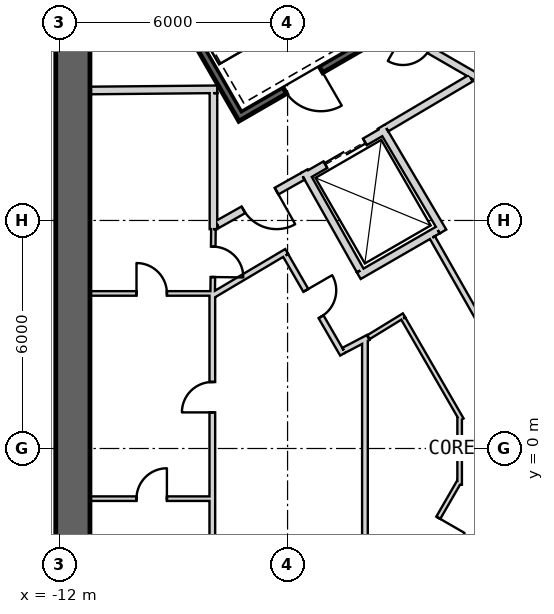
"""IFC4 building model, lengths in metres.
Left out: names, types, materials, properties, quantities, classifications, styles, units other than length and angle.
Written with IfcOpenShell. Run it as: python <this file> out.ifc"""

import sys

from ifc_helpers import new_model, si_unit, direction, frame, frame_2d, origin, place, context, subcontext, project, spatial, rectangle, extrude, element, fill, save


model = new_model("IFC4")
c1 = context("Model", 3, precision=1e-05, world=origin(), true_north=direction((0.0, 1.0)))
c2 = subcontext(c1, "Body", "Model", "MODEL_VIEW")
j1 = project(units=[si_unit("LENGTHUNIT", "METRE"), si_unit("PLANEANGLEUNIT", "RADIAN")], contexts=[c1])
p1 = place(None, origin())
s1 = spatial("IfcSite", under=j1, at=p1, CompositionType="ELEMENT")
p2 = place(p1, origin())
s2 = spatial("IfcBuilding", under=s1, at=p2, CompositionType="ELEMENT")
p3 = place(p2, frame((0.0, 0.0, -11.0)))
s3 = spatial("IfcBuildingStorey", under=s2, at=p3, CompositionType="ELEMENT", Elevation=-11.0)
p4 = place(p3, frame((19.475, 2.208, -0.4), z_axis=(0.0, 0.0, 1.0), x_axis=(-0.866028369851, 0.499994862586, 0.0)))
e1 = element("IfcWall", 1, at=p4, inside=s3, PredefinedType="SHEAR", context=c2, shape_type="SweptSolid", body=[
    extrude(rectangle(XDim=31.523, YDim=0.9, at=frame_2d((15.762, 0.0))), origin(), (0.0, 0.0, 1.0), 5.9),
])
p5 = place(p4, frame((3.612, 0.0, 0.4)))
e2 = element("IfcOpeningElement", 2, at=p5, cuts=e1, PredefinedType="OPENING", context=c2, shape_type="SweptSolid", body=[
    extrude(rectangle(XDim=1.2, YDim=2.4, at=frame_2d((0.6, 1.2))), frame((0.0, 0.46, 0.0), z_axis=(0.0, -1.0, 0.0), x_axis=(1.0, 0.0, 0.0)), (0.0, 0.0, 1.0), 0.92),
])
p6 = place(p4, frame((26.712, 0.0, 0.4)))
e3 = element("IfcOpeningElement", 3, at=p6, cuts=e1, PredefinedType="OPENING", context=c2, shape_type="SweptSolid", body=[
    extrude(rectangle(XDim=1.2, YDim=2.4, at=frame_2d((0.6, 1.2))), frame((0.0, 0.46, 0.0), z_axis=(0.0, -1.0, 0.0), x_axis=(1.0, 0.0, 0.0)), (0.0, 0.0, 1.0), 0.92),
])
p7 = place(p3, frame((-11.65, 15.762, -0.4), z_axis=(0.0, 0.0, 1.0), x_axis=(0.0, -1.0, 0.0)))
e4 = element("IfcWall", 4, at=p7, inside=s3, PredefinedType="SHEAR", context=c2, shape_type="SweptSolid", body=[
    extrude(rectangle(XDim=31.523, YDim=0.9, at=frame_2d((15.762, 0.0))), origin(), (0.0, 0.0, 1.0), 5.9),
])
p8 = place(p7, frame((3.612, 0.0, 0.4)))
e5 = element("IfcOpeningElement", 5, at=p8, cuts=e4, PredefinedType="OPENING", context=c2, shape_type="SweptSolid", body=[
    extrude(rectangle(XDim=1.2, YDim=2.4, at=frame_2d((0.6, 1.2))), frame((0.0, 0.46, 0.0), z_axis=(0.0, -1.0, 0.0), x_axis=(1.0, 0.0, 0.0)), (0.0, 0.0, 1.0), 0.92),
])
p9 = place(p7, frame((26.712, 0.0, 0.4)))
e6 = element("IfcOpeningElement", 6, at=p9, cuts=e4, PredefinedType="OPENING", context=c2, shape_type="SweptSolid", body=[
    extrude(rectangle(XDim=1.2, YDim=2.4, at=frame_2d((0.6, 1.2))), frame((0.0, 0.46, 0.0), z_axis=(0.0, -1.0, 0.0), x_axis=(1.0, 0.0, 0.0)), (0.0, 0.0, 1.0), 0.92),
])
p10 = place(p3, frame((-7.825, -17.97, -0.4), z_axis=(0.0, 0.0, 1.0), x_axis=(0.866028369851, 0.499994862586, 0.0)))
e7 = element("IfcWall", 7, at=p10, inside=s3, PredefinedType="SHEAR", context=c2, shape_type="SweptSolid", body=[
    extrude(rectangle(XDim=31.523, YDim=0.9, at=frame_2d((15.762, 0.0))), origin(), (0.0, 0.0, 1.0), 5.9),
])
p11 = place(p10, frame((17.862, 0.0, 0.4)))
e8 = element("IfcOpeningElement", 8, at=p11, cuts=e7, PredefinedType="OPENING", context=c2, shape_type="SweptSolid", body=[
    extrude(rectangle(XDim=1.2, YDim=2.4, at=frame_2d((0.6, 1.2))), frame((0.0, 0.46, 0.0), z_axis=(0.0, -1.0, 0.0), x_axis=(1.0, 0.0, 0.0)), (0.0, 0.0, 1.0), 0.92),
])
p12 = place(p10, frame((20.562, 0.0, 0.4)))
e9 = element("IfcOpeningElement", 9, at=p12, cuts=e7, PredefinedType="OPENING", context=c2, shape_type="SweptSolid", body=[
    extrude(rectangle(XDim=1.2, YDim=2.4, at=frame_2d((0.6, 1.2))), frame((0.0, 0.46, 0.0), z_axis=(0.0, -1.0, 0.0), x_axis=(1.0, 0.0, 0.0)), (0.0, 0.0, 1.0), 0.92),
])
p13 = place(p10, frame((26.712, 0.0, 0.4)))
e10 = element("IfcOpeningElement", 10, at=p13, cuts=e7, PredefinedType="OPENING", context=c2, shape_type="SweptSolid", body=[
    extrude(rectangle(XDim=1.2, YDim=2.4, at=frame_2d((0.6, 1.2))), frame((0.0, 0.46, 0.0), z_axis=(0.0, -1.0, 0.0), x_axis=(1.0, 0.0, 0.0)), (0.0, 0.0, 1.0), 0.92),
])
p14 = place(p10, frame((3.612, 0.0, 0.4)))
e11 = element("IfcOpeningElement", 11, at=p14, cuts=e7, PredefinedType="OPENING", context=c2, shape_type="SweptSolid", body=[
    extrude(rectangle(XDim=1.2, YDim=2.4, at=frame_2d((0.6, 1.2))), frame((0.0, 0.46, 0.0), z_axis=(0.0, -1.0, 0.0), x_axis=(1.0, 0.0, 0.0)), (0.0, 0.0, 1.0), 0.92),
])
p15 = place(p3, frame((-11.245, 15.678, -0.4), z_axis=(0.0, 0.0, 1.0), x_axis=(0.499977274689, -0.866038523851, 0.0)))
e12 = element("IfcWall", 12, at=p15, inside=s3, PredefinedType="SHEAR", context=c2, shape_type="SweptSolid", body=[
    extrude(rectangle(XDim=8.1, YDim=0.2, at=frame_2d((4.05, 0.0))), origin(), (0.0, 0.0, 1.0), 5.5),
])
p16 = place(p3, frame((-7.159, 8.8, -0.4), z_axis=(0.0, 0.0, 1.0), x_axis=(0.866047807691, 0.499961193289, 0.0)))
e13 = element("IfcWall", 13, at=p16, inside=s3, PredefinedType="SHEAR", context=c2, shape_type="SweptSolid", body=[
    extrude(rectangle(XDim=3.6, YDim=0.2, at=frame_2d((1.8, 0.0))), origin(), (0.0, 0.0, 1.0), 5.5),
])
p17 = place(p16, frame((1.25, 0.0, 0.4)))
e14 = element("IfcOpeningElement", 14, at=p17, cuts=e13, PredefinedType="OPENING", context=c2, shape_type="SweptSolid", body=[
    extrude(rectangle(XDim=1.1, YDim=2.1, at=frame_2d((0.55, 1.05))), frame((0.0, 0.11, 0.0), z_axis=(0.0, -1.0, 0.0), x_axis=(1.0, 0.0, 0.0)), (0.0, 0.0, 1.0), 0.22),
])
p18 = place(p3, frame((-5.524, 7.168, 0.0), z_axis=(0.0, 0.0, 1.0), x_axis=(0.866024647952, 0.500001309137, 0.0)))
e15 = element("IfcWall", 15, at=p18, inside=s3, PredefinedType="PLUMBINGWALL", context=c2, shape_type="SweptSolid", body=[
    extrude(rectangle(XDim=2.4, YDim=0.2, at=frame_2d((1.2, 0.0))), origin(), (0.0, 0.0, 1.0), 5.1),
])
p19 = place(p18, frame((0.6, 0.0, 0.0)))
e16 = element("IfcOpeningElement", 16, at=p19, cuts=e15, PredefinedType="OPENING", context=c2, shape_type="SweptSolid", body=[
    extrude(rectangle(XDim=1.2, YDim=2.4, at=frame_2d((0.6, 1.2))), frame((0.0, 0.11, 0.0), z_axis=(0.0, -1.0, 0.0), x_axis=(1.0, 0.0, 0.0)), (0.0, 0.0, 1.0), 0.22),
])
p20 = place(p3, frame((-3.538, 8.465, 0.0), z_axis=(0.0, 0.0, 1.0), x_axis=(0.508616218331, -0.860993346345, 0.0)))
e17 = element("IfcWall", 17, at=p20, inside=s3, PredefinedType="PLUMBINGWALL", context=c2, shape_type="SweptSolid", body=[
    extrude(rectangle(XDim=3.2, YDim=0.2, at=frame_2d((1.6, 0.0))), origin(), (0.0, 0.0, 1.0), 5.1),
])
p21 = place(p3, frame((-2.047, 5.746, 0.0), z_axis=(0.0, 0.0, 1.0), x_axis=(-0.866024647952, -0.500001309137, 0.0)))
e18 = element("IfcWall", 18, at=p21, inside=s3, PredefinedType="PLUMBINGWALL", context=c2, shape_type="SweptSolid", body=[
    extrude(rectangle(XDim=2.4, YDim=0.2, at=frame_2d((1.2, 0.0))), origin(), (0.0, 0.0, 1.0), 5.1),
])
p22 = place(p3, frame((-5.562, 7.296, 0.0), z_axis=(0.0, 0.0, 1.0), x_axis=(0.49134651263, -0.870964180966, 0.0)))
e19 = element("IfcWall", 19, at=p22, inside=s3, PredefinedType="PLUMBINGWALL", context=c2, shape_type="SweptSolid", body=[
    extrude(rectangle(XDim=3.0, YDim=0.2, at=frame_2d((1.5, 0.0))), origin(), (0.0, 0.0, 1.0), 5.1),
])
p23 = place(p3, frame((-11.2, 4.08, 0.0), z_axis=(0.0, 0.0, 1.0), x_axis=(1.0, 0.0, 0.0)))
e20 = element("IfcWall", 20, at=p23, inside=s3, PredefinedType="PARTITIONING", context=c2, shape_type="SweptSolid", body=[
    extrude(rectangle(XDim=3.25, YDim=0.12, at=frame_2d((1.625, 0.0))), origin(), (0.0, 0.0, 1.0), 5.1),
])
p24 = place(p23, frame((1.225, 0.0, 0.0)))
e21 = element("IfcOpeningElement", 21, at=p24, cuts=e20, PredefinedType="OPENING", context=c2, shape_type="SweptSolid", body=[
    extrude(rectangle(XDim=0.8, YDim=2.1, at=frame_2d((0.4, 1.05))), frame((0.0, 0.07, 0.0), z_axis=(0.0, -1.0, 0.0), x_axis=(1.0, 0.0, 0.0)), (0.0, 0.0, 1.0), 0.14),
])
p25 = place(p3, frame((-7.85, 9.451, 0.0), z_axis=(0.0, 0.0, 1.0), x_axis=(-0.999957167047, -0.009255488683, 0.0)))
e22 = element("IfcWall", 22, at=p25, inside=s3, PredefinedType="PARTITIONING", context=c2, shape_type="SweptSolid", body=[
    extrude(rectangle(XDim=3.35, YDim=0.2, at=frame_2d((1.675, 0.0))), origin(), (0.0, 0.0, 1.0), 5.1),
])
p26 = place(p3, frame((-7.95, 5.772, 0.0), z_axis=(0.0, 0.0, 1.0), x_axis=(0.0, 1.0, 0.0)))
e23 = element("IfcWall", 23, at=p26, inside=s3, PredefinedType="PARTITIONING", context=c2, shape_type="SweptSolid", body=[
    extrude(rectangle(XDim=3.578, YDim=0.2, at=frame_2d((1.789, 0.0))), origin(), (0.0, 0.0, 1.0), 5.1),
])
p27 = place(p3, frame((-7.971, 4.05, 0.0), z_axis=(0.0, 0.0, 1.0), x_axis=(0.012047318415, 0.999927428426, 0.0)))
e24 = element("IfcWall", 24, at=p27, inside=s3, PredefinedType="PARTITIONING", context=c2, shape_type="SweptSolid", body=[
    extrude(rectangle(XDim=1.723, YDim=0.12, at=frame_2d((0.861, 0.0))), origin(), (0.0, 0.0, 1.0), 5.1),
])
p28 = place(p27, frame((0.461, 0.0, 0.0)))
e25 = element("IfcOpeningElement", 25, at=p28, cuts=e24, PredefinedType="OPENING", context=c2, shape_type="SweptSolid", body=[
    extrude(rectangle(XDim=0.8, YDim=2.1, at=frame_2d((0.4, 1.05))), frame((0.0, 0.07, 0.0), z_axis=(0.0, -1.0, 0.0), x_axis=(1.0, 0.0, 0.0)), (0.0, 0.0, 1.0), 0.14),
])
p29 = place(p3, frame((-11.2, -1.32, 0.0), z_axis=(0.0, 0.0, 1.0), x_axis=(1.0, 0.0, 0.0)))
e26 = element("IfcWall", 26, at=p29, inside=s3, PredefinedType="PARTITIONING", context=c2, shape_type="SweptSolid", body=[
    extrude(rectangle(XDim=3.25, YDim=0.12, at=frame_2d((1.625, 0.0))), origin(), (0.0, 0.0, 1.0), 5.1),
])
p30 = place(p29, frame((1.225, 0.0, 0.0)))
e27 = element("IfcOpeningElement", 27, at=p30, cuts=e26, PredefinedType="OPENING", context=c2, shape_type="SweptSolid", body=[
    extrude(rectangle(XDim=0.8, YDim=2.1, at=frame_2d((0.4, 1.05))), frame((0.0, 0.07, 0.0), z_axis=(0.0, -1.0, 0.0), x_axis=(1.0, 0.0, 0.0)), (0.0, 0.0, 1.0), 0.14),
])
p31 = place(p3, frame((-7.98, 4.05, 0.0), z_axis=(0.0, 0.0, 1.0), x_axis=(0.0, -1.0, 0.0)))
e28 = element("IfcWall", 28, at=p31, inside=s3, PredefinedType="PLUMBINGWALL", context=c2, shape_type="SweptSolid", body=[
    extrude(rectangle(XDim=8.1, YDim=0.15, at=frame_2d((4.05, 0.0))), origin(), (0.0, 0.0, 1.0), 5.1),
])
p32 = place(p31, frame((2.3, 0.0, 0.0)))
e29 = element("IfcOpeningElement", 29, at=p32, cuts=e28, PredefinedType="OPENING", context=c2, shape_type="SweptSolid", body=[
    extrude(rectangle(XDim=0.8, YDim=2.1, at=frame_2d((0.4, 1.05))), frame((0.0, 0.085, 0.0), z_axis=(0.0, -1.0, 0.0), x_axis=(1.0, 0.0, 0.0)), (0.0, 0.0, 1.0), 0.17),
])
p33 = place(p3, frame((-4.296, 11.66, 0.0), z_axis=(0.0, 0.0, 1.0), x_axis=(0.866027389382, -0.499996560828, 0.0)))
e30 = element("IfcWall", 30, at=p33, inside=s3, PredefinedType="PARTITIONING", context=c2, shape_type="SweptSolid", body=[
    extrude(rectangle(XDim=3.778, YDim=0.2, at=frame_2d((1.889, 0.0))), origin(), (0.0, 0.0, 1.0), 5.1),
])
p34 = place(p33, frame((1.539, 0.0, 0.0)))
e31 = element("IfcOpeningElement", 31, at=p34, cuts=e30, PredefinedType="OPENING", context=c2, shape_type="SweptSolid", body=[
    extrude(rectangle(XDim=0.8, YDim=2.1, at=frame_2d((0.4, 1.05))), frame((0.0, 0.11, 0.0), z_axis=(0.0, -1.0, 0.0), x_axis=(1.0, 0.0, 0.0)), (0.0, 0.0, 1.0), 0.22),
])
p35 = place(p3, frame((-1.179, 9.745, 0.0), z_axis=(0.0, 0.0, 1.0), x_axis=(-0.860630814782, -0.509229418482, 0.0)))
e32 = element("IfcWall", 32, at=p35, inside=s3, PredefinedType="PARTITIONING", context=c2, shape_type="SweptSolid", body=[
    extrude(rectangle(XDim=2.582, YDim=0.2, at=frame_2d((1.291, 0.0))), origin(), (0.0, 0.0, 1.0), 5.1),
])
p36 = place(p3, frame((-5.6, 7.16, 0.0), z_axis=(0.0, 0.0, 1.0), x_axis=(-0.871350695252, -0.490660744185, 0.0)))
e33 = element("IfcWall", 33, at=p36, inside=s3, PredefinedType="PARTITIONING", context=c2, shape_type="SweptSolid", body=[
    extrude(rectangle(XDim=2.582, YDim=0.2, at=frame_2d((1.291, 0.0))), origin(), (0.0, 0.0, 1.0), 5.1),
])
p37 = place(p36, frame((0.791, 0.0, 0.0)))
e34 = element("IfcOpeningElement", 34, at=p37, cuts=e33, PredefinedType="OPENING", context=c2, shape_type="SweptSolid", body=[
    extrude(rectangle(XDim=1.0, YDim=2.1, at=frame_2d((0.5, 1.05))), frame((0.0, 0.11, 0.0), z_axis=(0.0, -1.0, 0.0), x_axis=(1.0, 0.0, 0.0)), (0.0, 0.0, 1.0), 0.22),
])
p38 = place(p3, frame((-2.189, 5.549, 0.0), z_axis=(0.0, 0.0, 1.0), x_axis=(0.494335077001, -0.869271437266, 0.0)))
e35 = element("IfcWall", 35, at=p38, inside=s3, PredefinedType="PLUMBINGWALL", context=c2, shape_type="SweptSolid", body=[
    extrude(rectangle(XDim=4.404, YDim=0.15, at=frame_2d((2.202, 0.0))), origin(), (0.0, 0.0, 1.0), 5.1),
])
p39 = place(p3, frame((0.051, -1.611, 0.0), z_axis=(0.0, 0.0, 1.0), x_axis=(-0.49434454467, -0.869266053148, 0.0)))
e36 = element("IfcWall", 36, at=p39, inside=s3, PredefinedType="PARTITIONING", context=c2, shape_type="SweptSolid", body=[
    extrude(rectangle(XDim=4.53, YDim=0.12, at=frame_2d((2.265, 0.0))), origin(), (0.0, 0.0, 1.0), 5.1),
])
p40 = place(p39, frame((1.916, 0.0, 0.0)))
e37 = element("IfcOpeningElement", 37, at=p40, cuts=e36, PredefinedType="OPENING", context=c2, shape_type="SweptSolid", body=[
    extrude(rectangle(XDim=0.8, YDim=2.1, at=frame_2d((0.4, 1.05))), frame((0.0, 0.07, 0.0), z_axis=(0.0, -1.0, 0.0), x_axis=(1.0, 0.0, 0.0)), (0.0, 0.0, 1.0), 0.14),
])
p41 = place(p3, frame((-3.964, -2.908, 0.0), z_axis=(0.0, 0.0, 1.0), x_axis=(0.0, 1.0, 0.0)))
e38 = element("IfcWall", 38, at=p41, inside=s3, PredefinedType="PLUMBINGWALL", context=c2, shape_type="SweptSolid", body=[
    extrude(rectangle(XDim=5.815, YDim=0.15, at=frame_2d((2.908, 0.0))), origin(), (0.0, 0.0, 1.0), 5.1),
])
p42 = place(p3, frame((-6.024, 5.183, 0.0), z_axis=(0.0, 0.0, 1.0), x_axis=(-0.860126804455, -0.510080268447, 0.0)))
e39 = element("IfcWall", 39, at=p42, inside=s3, PredefinedType="PLUMBINGWALL", context=c2, shape_type="SweptSolid", body=[
    extrude(rectangle(XDim=2.24, YDim=0.15, at=frame_2d((1.12, 0.0))), origin(), (0.0, 0.0, 1.0), 5.1),
])
p43 = place(p3, frame((-4.551, 2.482, 0.0), z_axis=(0.0, 0.0, 1.0), x_axis=(-0.499990139034, 0.866031096941, 0.0)))
e40 = element("IfcWall", 40, at=p43, inside=s3, PredefinedType="PLUMBINGWALL", context=c2, shape_type="SweptSolid", body=[
    extrude(rectangle(XDim=3.0, YDim=0.15, at=frame_2d((1.5, 0.0))), origin(), (0.0, 0.0, 1.0), 5.1),
])
p44 = place(p43, frame((1.137, 0.0, 0.0)))
e41 = element("IfcOpeningElement", 41, at=p44, cuts=e40, PredefinedType="OPENING", context=c2, shape_type="SweptSolid", body=[
    extrude(rectangle(XDim=0.8, YDim=2.1, at=frame_2d((0.4, 1.05))), frame((0.0, 0.085, 0.0), z_axis=(0.0, -1.0, 0.0), x_axis=(1.0, 0.0, 0.0)), (0.0, 0.0, 1.0), 0.17),
])
p45 = place(p3, frame((-3.881, 2.919, 0.0), z_axis=(0.0, 0.0, 1.0), x_axis=(-0.885422176933, -0.464787659684, 0.0)))
e42 = element("IfcWall", 42, at=p45, inside=s3, PredefinedType="PLUMBINGWALL", context=c2, shape_type="SweptSolid", body=[
    extrude(rectangle(XDim=0.724, YDim=0.15, at=frame_2d((0.362, 0.0))), origin(), (0.0, 0.0, 1.0), 5.1),
])
p46 = place(p3, frame((-2.935, 3.503, 0.0), z_axis=(0.0, 0.0, 1.0), x_axis=(-0.852482838041, -0.522755211209, 0.0)))
e43 = element("IfcWall", 43, at=p46, inside=s3, PredefinedType="PARTITIONING", context=c2, shape_type="SweptSolid", body=[
    extrude(rectangle(XDim=1.097, YDim=0.12, at=frame_2d((0.548, 0.0))), origin(), (0.0, 0.0, 1.0), 5.1),
])
p47 = place(p3, frame((-1.42, 0.76, 0.0), z_axis=(0.0, 0.0, 1.0), x_axis=(-0.500011413361, 0.866018814177, 0.0)))
e44 = element("IfcWall", 44, at=p47, inside=s3, PredefinedType="PARTITIONING", context=c2, shape_type="SweptSolid", body=[
    extrude(rectangle(XDim=3.072, YDim=0.12, at=frame_2d((1.536, 0.0))), origin(), (0.0, 0.0, 1.0), 5.1),
])
p48 = place(p3, frame((-1.472, -0.954, 0.0), z_axis=(0.0, 0.0, 1.0), x_axis=(0.0, 1.0, 0.0)))
e45 = element("IfcWall", 45, at=p48, inside=s3, PredefinedType="PARTITIONING", context=c2, shape_type="SweptSolid", body=[
    extrude(rectangle(XDim=1.785, YDim=0.12, at=frame_2d((0.893, 0.0))), origin(), (0.0, 0.0, 1.0), 5.1),
])
p49 = place(p3, frame((-3.016, -3.524, 0.0), z_axis=(0.0, 0.0, 1.0), x_axis=(0.499988681553, 0.866031938394, 0.0)))
e46 = element("IfcWall", 46, at=p49, inside=s3, PredefinedType="PARTITIONING", context=c2, shape_type="SweptSolid", body=[
    extrude(rectangle(XDim=3.069, YDim=0.12, at=frame_2d((1.535, 0.0))), origin(), (0.0, 0.0, 1.0), 5.1),
])
p50 = place(p49, frame((1.165, 0.0, 0.0)))
e47 = element("IfcOpeningElement", 47, at=p50, cuts=e46, PredefinedType="OPENING", context=c2, shape_type="SweptSolid", body=[
    extrude(rectangle(XDim=0.8, YDim=2.1, at=frame_2d((0.4, 1.05))), frame((0.0, 0.07, 0.0), z_axis=(0.0, -1.0, 0.0), x_axis=(1.0, 0.0, 0.0)), (0.0, 0.0, 1.0), 0.14),
])
p51 = place(p3, frame((30.376, 1.169, 0.0), z_axis=(0.0, 0.0, 1.0), x_axis=(-0.865777000343, 0.500430000777, 0.0)))
e48 = element("IfcWall", 48, at=p51, inside=s3, PredefinedType="PARTITIONING", context=c2, shape_type="SweptSolid", body=[
    extrude(rectangle(XDim=39.978, YDim=0.12, at=frame_2d((19.989, 0.0))), origin(), (0.0, 0.0, 1.0), 4.18),
])
p52 = place(p51, frame((28.784, 0.0, 0.0)))
e49 = element("IfcOpeningElement", 49, at=p52, cuts=e48, PredefinedType="OPENING", context=c2, shape_type="SweptSolid", body=[
    extrude(rectangle(XDim=1.2, YDim=2.4, at=frame_2d((0.6, 1.2))), frame((0.0, 0.07, 0.0), z_axis=(0.0, -1.0, 0.0), x_axis=(1.0, 0.0, 0.0)), (0.0, 0.0, 1.0), 0.14),
])
p53 = place(p51, frame((9.984, 0.0, 0.0)))
e50 = element("IfcOpeningElement", 50, at=p53, cuts=e48, PredefinedType="OPENING", context=c2, shape_type="SweptSolid", body=[
    extrude(rectangle(XDim=1.2, YDim=2.4, at=frame_2d((0.6, 1.2))), frame((0.0, 0.07, 0.0), z_axis=(0.0, -1.0, 0.0), x_axis=(1.0, 0.0, 0.0)), (0.0, 0.0, 1.0), 0.14),
])
p54 = place(p17, origin())
e51 = element("IfcDoor", 51, at=p54, inside=s3, OperationType="SINGLE_SWING_RIGHT", PredefinedType="USERDEFINED", context=c2, shape_type="SweptSolid", body=[
    extrude(rectangle(XDim=1.1, YDim=2.1, at=frame_2d((0.55, 1.05))), frame((0.0, 0.025, 0.0), z_axis=(0.0, -1.0, 0.0), x_axis=(1.0, 0.0, 0.0)), (0.0, 0.0, 1.0), 0.05),
])
fill(e14, e51)
p55 = place(p37, origin())
e52 = element("IfcDoor", 52, at=p55, inside=s3, OperationType="SINGLE_SWING_LEFT", PredefinedType="USERDEFINED", context=c2, shape_type="SweptSolid", body=[
    extrude(rectangle(XDim=1.0, YDim=2.1, at=frame_2d((0.5, 1.05))), frame((0.0, 0.025, 0.0), z_axis=(0.0, -1.0, 0.0), x_axis=(1.0, 0.0, 0.0)), (0.0, 0.0, 1.0), 0.05),
])
fill(e34, e52)
p56 = place(p19, origin())
e53 = element("IfcDoor", 53, at=p56, inside=s3, OperationType="SLIDING_TO_LEFT", PredefinedType="USERDEFINED", context=c2, shape_type="SweptSolid", body=[
    extrude(rectangle(XDim=1.2, YDim=2.4, at=frame_2d((0.6, 1.2))), frame((0.0, 0.025, 0.0), z_axis=(0.0, -1.0, 0.0), x_axis=(1.0, 0.0, 0.0)), (0.0, 0.0, 1.0), 0.05),
])
fill(e16, e53)
p57 = place(p44, origin())
e54 = element("IfcDoor", 54, at=p57, inside=s3, OperationType="SINGLE_SWING_RIGHT", PredefinedType="USERDEFINED", context=c2, shape_type="SweptSolid", body=[
    extrude(rectangle(XDim=0.8, YDim=2.1, at=frame_2d((0.4, 1.05))), frame((0.0, 0.025, 0.0), z_axis=(0.0, -1.0, 0.0), x_axis=(1.0, 0.0, 0.0)), (0.0, 0.0, 1.0), 0.05),
])
fill(e41, e54)
p58 = place(p50, origin())
e55 = element("IfcDoor", 55, at=p58, inside=s3, OperationType="SINGLE_SWING_RIGHT", PredefinedType="USERDEFINED", context=c2, shape_type="SweptSolid", body=[
    extrude(rectangle(XDim=0.8, YDim=2.1, at=frame_2d((0.4, 1.05))), frame((0.0, 0.025, 0.0), z_axis=(0.0, -1.0, 0.0), x_axis=(1.0, 0.0, 0.0)), (0.0, 0.0, 1.0), 0.05),
])
fill(e47, e55)
p59 = place(p28, origin())
e56 = element("IfcDoor", 56, at=p59, inside=s3, OperationType="SINGLE_SWING_LEFT", PredefinedType="USERDEFINED", context=c2, shape_type="SweptSolid", body=[
    extrude(rectangle(XDim=0.8, YDim=2.1, at=frame_2d((0.4, 1.05))), frame((0.0, 0.025, 0.0), z_axis=(0.0, -1.0, 0.0), x_axis=(1.0, 0.0, 0.0)), (0.0, 0.0, 1.0), 0.05),
])
fill(e25, e56)
p60 = place(p30, origin())
e57 = element("IfcDoor", 57, at=p60, inside=s3, OperationType="SINGLE_SWING_RIGHT", PredefinedType="USERDEFINED", context=c2, shape_type="SweptSolid", body=[
    extrude(rectangle(XDim=0.8, YDim=2.1, at=frame_2d((0.4, 1.05))), frame((0.0, 0.025, 0.0), z_axis=(0.0, -1.0, 0.0), x_axis=(1.0, 0.0, 0.0)), (0.0, 0.0, 1.0), 0.05),
])
fill(e27, e57)
p61 = place(p32, origin())
e58 = element("IfcDoor", 58, at=p61, inside=s3, OperationType="SINGLE_SWING_RIGHT", PredefinedType="USERDEFINED", context=c2, shape_type="SweptSolid", body=[
    extrude(rectangle(XDim=0.8, YDim=2.1, at=frame_2d((0.4, 1.05))), frame((0.0, 0.025, 0.0), z_axis=(0.0, -1.0, 0.0), x_axis=(1.0, 0.0, 0.0)), (0.0, 0.0, 1.0), 0.05),
])
fill(e29, e58)
p62 = place(p24, origin())
e59 = element("IfcDoor", 59, at=p62, inside=s3, OperationType="SINGLE_SWING_LEFT", PredefinedType="USERDEFINED", context=c2, shape_type="SweptSolid", body=[
    extrude(rectangle(XDim=0.8, YDim=2.1, at=frame_2d((0.4, 1.05))), frame((0.0, 0.025, 0.0), z_axis=(0.0, -1.0, 0.0), x_axis=(1.0, 0.0, 0.0)), (0.0, 0.0, 1.0), 0.05),
])
fill(e21, e59)
save(model, sys.argv[1])
